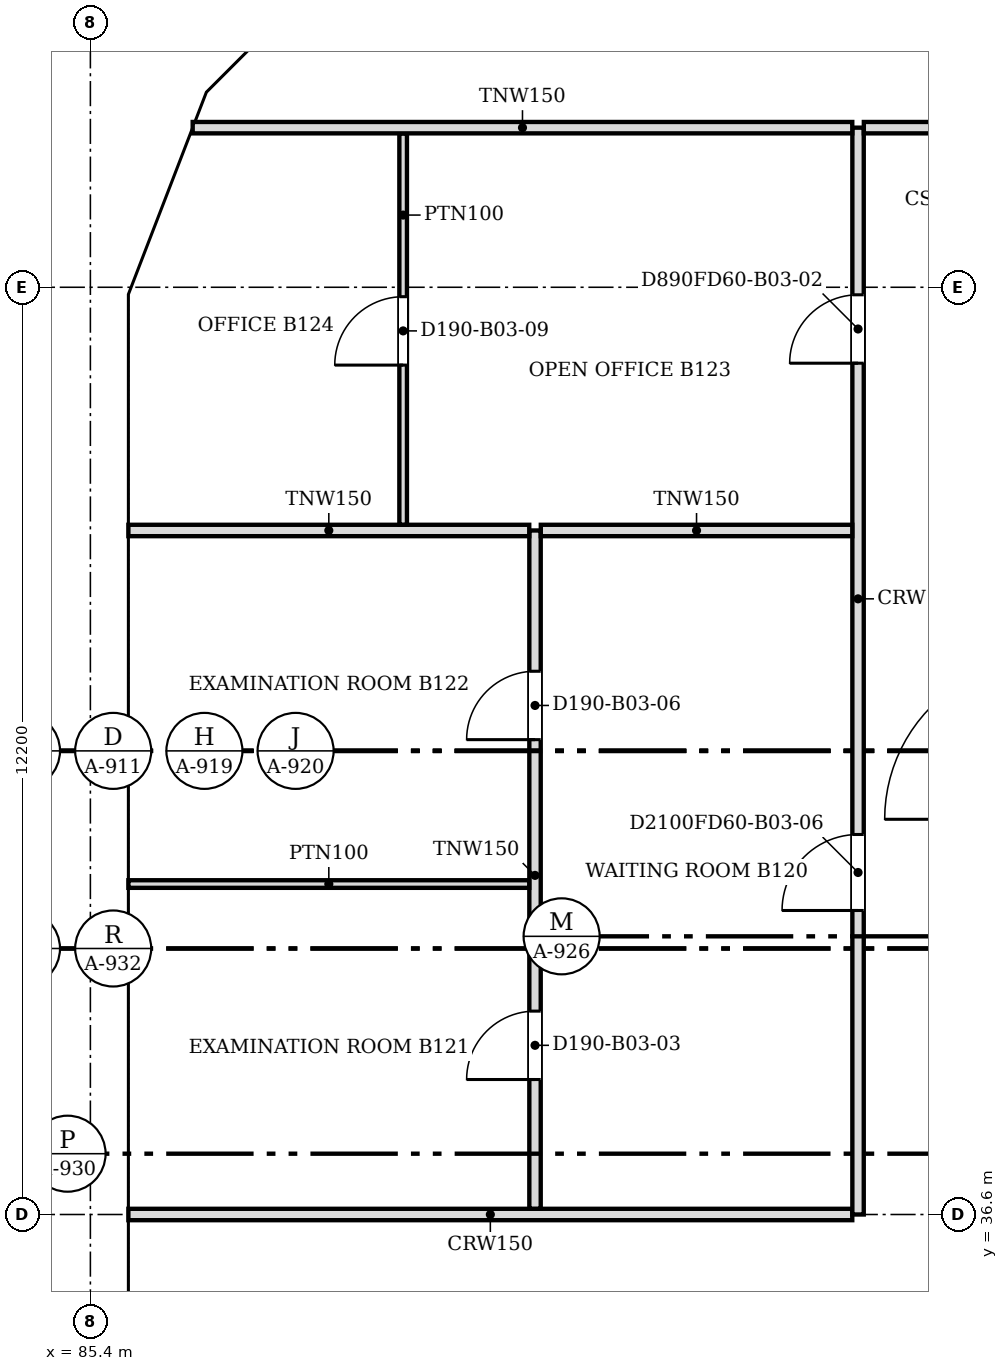
"""IFC4 building model, lengths in metres.
Left out: names, types, materials, properties, quantities, classifications, styles, units other than length and angle.
Written with IfcOpenShell. Run it as: python <this file> out.ifc"""

import sys

from ifc_helpers import new_model, si_unit, direction, frame, frame_2d, origin, place, context, subcontext, project, spatial, polyline, rectangle, outline, extrude, faceted_brep, source, transform, mapped, element, fill, save


model = new_model("IFC4")
c1 = context("Model", 3, precision=1e-05, world=origin(), true_north=direction((0.0, 1.0)))
c2 = subcontext(c1, "Body", "Model", "MODEL_VIEW")
j1 = project(units=[si_unit("LENGTHUNIT", "METRE"), si_unit("PLANEANGLEUNIT", "RADIAN")], contexts=[c1])
p1 = place(None, origin())
s1 = spatial("IfcSite", under=j1, at=p1, CompositionType="ELEMENT")
p2 = place(p1, origin())
s2 = spatial("IfcBuilding", under=s1, at=p2, CompositionType="ELEMENT")
p3 = place(p2, frame((0.0, 0.0, 25.8)))
s3 = spatial("IfcBuildingStorey", under=s2, at=p3, CompositionType="ELEMENT", Elevation=25.8)
m1 = source(origin(), c2, "Body", "Brep", [
    faceted_brep([(2.997, -0.25, 3.732), (2.944, -0.25, 3.8), (0.0, -0.25, 0.0), (2.997, -0.25, 0.0), (0.053, 0.25, 0.068), (2.891, 0.25, 3.732), (2.891, 0.25, 0.0), (0.053, 0.25, 0.0), (2.944, 0.0, 3.8), (0.0, 0.0, 0.0)], [[[0, 1, 2, 3]], [[4, 5, 6, 7]], [[8, 1, 0]], [[5, 4, 9, 2, 1, 8]], [[7, 6, 3, 2, 9]], [[7, 9, 4]], [[3, 6, 5, 8, 0]]]),
])
p4 = place(p3, frame((88.794, 53.588, 0.0), z_axis=(0.0, 0.0, 1.0), x_axis=(-0.707066050402, -0.707147509625, 0.0)))
e1 = element("IfcWall", 1, at=p4, inside=s3, PredefinedType="SOLIDWALL", context=c2, shape_type="MappedRepresentation", body=[
    mapped(m1, transform((0.0, 0.0, 0.0), scale=1.0)),
])
m2 = source(origin(), c2, "Body", "SweptSolid", [
    extrude(outline(polyline([(2.744, 3.134), (0.51, 0.25), (2.744, 0.25), (2.744, 3.134)])), frame((0.0, 0.26, 0.0), z_axis=(0.0, -1.0, 0.0), x_axis=(1.0, 0.0, 0.0)), (0.0, 0.0, 1.0), 0.52),
])
p5 = place(p4, origin())
e2 = element("IfcOpeningElement", 2, at=p5, cuts=e1, PredefinedType="OPENING", context=c2, shape_type="MappedRepresentation", body=[
    mapped(m2, transform((0.0, 0.0, 0.0), scale=1.0)),
])
m3 = source(origin(), c2, "Body", "Brep", [
    faceted_brep([(3.003, -0.25, 0.0), (0.053, -0.25, 3.8), (0.0, -0.25, 3.732), (0.0, -0.25, 0.0), (0.106, 0.25, 3.732), (2.957, 0.25, 0.06), (2.957, 0.25, 0.0), (0.106, 0.25, 0.0), (0.053, 0.0, 3.8), (3.003, 0.0, 0.0)], [[[0, 1, 2, 3]], [[4, 5, 6, 7]], [[5, 4, 8, 1, 0, 9]], [[2, 1, 8]], [[7, 6, 9, 0, 3]], [[7, 3, 2, 8, 4]], [[9, 6, 5]]]),
])
p6 = place(p3, frame((86.731, 51.556, 0.0), z_axis=(0.0, 0.0, 1.0), x_axis=(-0.359855894603, -0.933007896601, 0.0)))
e3 = element("IfcWall", 3, at=p6, inside=s3, PredefinedType="SOLIDWALL", context=c2, shape_type="MappedRepresentation", body=[
    mapped(m3, transform((0.0, 0.0, 0.0), scale=1.0)),
])
m4 = source(origin(), c2, "Body", "SweptSolid", [
    extrude(outline(polyline([(2.493, 0.25), (0.253, 3.135), (0.253, 0.25), (2.493, 0.25)])), frame((0.0, 0.26, 0.0), z_axis=(0.0, -1.0, 0.0), x_axis=(1.0, 0.0, 0.0)), (0.0, 0.0, 1.0), 0.52),
])
p7 = place(p6, origin())
e4 = element("IfcOpeningElement", 4, at=p7, cuts=e3, PredefinedType="OPENING", context=c2, shape_type="MappedRepresentation", body=[
    mapped(m4, transform((0.0, 0.0, 0.0), scale=1.0)),
])
m5 = source(origin(), c2, "Body", "Brep", [
    faceted_brep([(6.053, -0.25, 0.0), (3.003, -0.25, 3.8), (0.0, -0.25, 0.0), (0.047, 0.25, 0.059), (3.003, 0.25, 3.8), (6.053, 0.25, 0.0), (0.047, 0.25, 0.0), (0.0, 0.0, 0.0)], [[[0, 1, 2]], [[3, 4, 5, 6]], [[5, 4, 1, 0]], [[4, 3, 7, 2, 1]], [[6, 5, 0, 2, 7]], [[6, 7, 3]]]),
])
p8 = place(p3, frame((85.65, 48.753, 0.0), z_axis=(0.0, 0.0, 1.0), x_axis=(0.0, -1.0, 0.0)))
e5 = element("IfcWall", 5, at=p8, inside=s3, PredefinedType="SOLIDWALL", context=c2, shape_type="MappedRepresentation", body=[
    mapped(m5, transform((0.0, 0.0, 0.0), scale=1.0)),
])
m6 = source(origin(), c2, "Body", "SweptSolid", [
    extrude(outline(polyline([(5.532, 0.25), (3.005, 3.399), (0.516, 0.25), (5.532, 0.25)])), frame((0.0, 0.26, 0.0), z_axis=(0.0, -1.0, 0.0), x_axis=(1.0, 0.0, 0.0)), (0.0, 0.0, 1.0), 0.52),
])
p9 = place(p8, origin())
e6 = element("IfcOpeningElement", 6, at=p9, cuts=e5, PredefinedType="OPENING", context=c2, shape_type="MappedRepresentation", body=[
    mapped(m6, transform((0.0, 0.0, 0.0), scale=1.0)),
])
m7 = source(origin(), c2, "Body", "Brep", [
    faceted_brep([(6.1, -0.25, 0.0), (3.05, -0.25, 3.8), (0.0, -0.25, 0.0), (6.1, -0.25, 0.0), (0.0, 0.25, 0.0), (3.05, 0.25, 3.8), (6.1, 0.25, 0.0), (6.1, 0.25, 0.0)], [[[0, 1, 2, 3]], [[4, 5, 6, 7]], [[6, 5, 1, 0]], [[5, 4, 2, 1]], [[4, 7, 3, 2]], [[3, 7, 6, 0]]]),
])
p10 = place(p3, frame((85.65, 42.7, 0.0), z_axis=(0.0, 0.0, 1.0), x_axis=(0.0, -1.0, 0.0)))
e7 = element("IfcWall", 7, at=p10, inside=s3, PredefinedType="SOLIDWALL", context=c2, shape_type="MappedRepresentation", body=[
    mapped(m7, transform((0.0, 0.0, 0.0), scale=1.0)),
])
m8 = source(origin(), c2, "Body", "SweptSolid", [
    extrude(outline(polyline([(5.579, 0.25), (3.05, 3.401), (0.521, 0.25), (5.579, 0.25)])), frame((0.0, 0.26, 0.0), z_axis=(0.0, -1.0, 0.0), x_axis=(1.0, 0.0, 0.0)), (0.0, 0.0, 1.0), 0.52),
])
p11 = place(p10, origin())
e8 = element("IfcOpeningElement", 8, at=p11, cuts=e7, PredefinedType="OPENING", context=c2, shape_type="MappedRepresentation", body=[
    mapped(m8, transform((0.0, 0.0, 0.0), scale=1.0)),
])
m9 = source(origin(), c2, "Body", "SweptSolid", [
    extrude(outline(polyline([(6.1, 0.0), (3.05, 3.8), (0.0, 0.0), (6.1, 0.0)])), frame((0.0, 0.25, 0.0), z_axis=(0.0, -1.0, 0.0), x_axis=(1.0, 0.0, 0.0)), (0.0, 0.0, 1.0), 0.5),
])
p12 = place(p3, frame((85.65, 36.6, 0.0), z_axis=(0.0, 0.0, 1.0), x_axis=(0.0, -1.0, 0.0)))
e9 = element("IfcWall", 9, at=p12, inside=s3, PredefinedType="SOLIDWALL", context=c2, shape_type="MappedRepresentation", body=[
    mapped(m9, transform((0.0, 0.0, 0.0), scale=1.0)),
])
p13 = place(p12, origin())
e10 = element("IfcOpeningElement", 10, at=p13, cuts=e9, PredefinedType="OPENING", context=c2, shape_type="MappedRepresentation", body=[
    mapped(m8, transform((0.0, 0.0, 0.0), scale=1.0)),
])
p14 = place(p2, frame((0.0, 0.0, 29.6)))
s4 = spatial("IfcBuildingStorey", under=s2, at=p14, CompositionType="ELEMENT", Elevation=29.6)
m10 = source(origin(), c2, "Body", "Brep", [
    faceted_brep([(0.053, -0.25, 0.0), (2.997, -0.25, 3.8), (0.053, -0.25, 7.6), (0.0, -0.25, 7.532), (0.0, -0.25, 0.068), (0.106, 0.25, 7.531), (2.944, 0.25, 3.868), (2.944, 0.25, 3.732), (0.106, 0.25, 0.068), (2.997, 0.0, 3.8), (0.053, 0.0, 0.0), (0.053, 0.0, 7.6)], [[[0, 1, 2, 3, 4]], [[5, 6, 7, 8]], [[8, 7, 9, 1, 0, 10]], [[6, 5, 11, 2, 1, 9]], [[3, 2, 11]], [[10, 0, 4]], [[8, 10, 4, 3, 11, 5]], [[7, 6, 9]]]),
])
p15 = place(p14, frame((88.831, 53.625, -3.8), z_axis=(0.0, 0.0, 1.0), x_axis=(-0.707147509625, -0.707066050402, 0.0)))
e11 = element("IfcWall", 11, at=p15, inside=s4, PredefinedType="SOLIDWALL", context=c2, shape_type="MappedRepresentation", body=[
    mapped(m10, transform((0.0, 0.0, 0.0), scale=1.0)),
])
m11 = source(origin(), c2, "Body", "SweptSolid", [
    extrude(outline(polyline([(0.253, 0.666), (2.681, 3.8), (0.253, 6.934), (0.253, 0.666)])), frame((0.0, 0.26, 0.0), z_axis=(0.0, -1.0, 0.0), x_axis=(1.0, 0.0, 0.0)), (0.0, 0.0, 1.0), 0.52),
])
p16 = place(p15, origin())
e12 = element("IfcOpeningElement", 12, at=p16, cuts=e11, PredefinedType="OPENING", context=c2, shape_type="MappedRepresentation", body=[
    mapped(m11, transform((0.0, 0.0, 0.0), scale=1.0)),
])
m12 = source(origin(), c2, "Body", "Brep", [
    faceted_brep([(2.95, -0.25, 0.0), (2.997, -0.25, 0.059), (2.997, -0.25, 7.541), (2.95, -0.25, 7.6), (0.0, -0.25, 3.8), (0.053, 0.25, 3.868), (2.904, 0.25, 7.54), (2.904, 0.25, 0.06), (0.053, 0.25, 3.732), (2.95, 0.0, 0.0), (2.95, 0.0, 7.6), (0.0, 0.0, 3.8)], [[[0, 1, 2, 3, 4]], [[5, 6, 7, 8]], [[1, 0, 9]], [[10, 3, 2]], [[6, 5, 11, 4, 3, 10]], [[8, 7, 9, 0, 4, 11]], [[8, 11, 5]], [[1, 9, 7, 6, 10, 2]]]),
])
p17 = place(p14, frame((86.712, 51.506, -3.8), z_axis=(0.0, 0.0, 1.0), x_axis=(-0.359874094142, -0.933000876937, 0.0)))
e13 = element("IfcWall", 13, at=p17, inside=s4, PredefinedType="SOLIDWALL", context=c2, shape_type="MappedRepresentation", body=[
    mapped(m12, transform((0.0, 0.0, 0.0), scale=1.0)),
])
m13 = source(origin(), c2, "Body", "SweptSolid", [
    extrude(outline(polyline([(2.75, 6.935), (0.316, 3.8), (2.75, 0.665), (2.75, 6.935)])), frame((0.0, 0.26, 0.0), z_axis=(0.0, -1.0, 0.0), x_axis=(1.0, 0.0, 0.0)), (0.0, 0.0, 1.0), 0.52),
])
p18 = place(p17, origin())
e14 = element("IfcOpeningElement", 14, at=p18, cuts=e13, PredefinedType="OPENING", context=c2, shape_type="MappedRepresentation", body=[
    mapped(m13, transform((0.0, 0.0, 0.0), scale=1.0)),
])
m14 = source(origin(), c2, "Body", "Brep", [
    faceted_brep([(0.047, -0.25, 0.0), (3.05, -0.25, 3.8), (0.047, -0.25, 7.6), (0.0, -0.25, 7.54), (0.0, -0.25, 0.06), (0.093, 0.25, 7.541), (3.05, 0.25, 3.8), (0.093, 0.25, 0.059), (0.047, 0.0, 0.0), (0.047, 0.0, 7.6)], [[[0, 1, 2, 3, 4]], [[5, 6, 7]], [[7, 6, 1, 0, 8]], [[6, 5, 9, 2, 1]], [[3, 2, 9]], [[8, 0, 4]], [[7, 8, 4, 3, 9, 5]]]),
])
p19 = place(p14, frame((85.65, 48.8, -3.8), z_axis=(0.0, 0.0, 1.0), x_axis=(0.0, -1.0, 0.0)))
e15 = element("IfcWall", 15, at=p19, inside=s4, PredefinedType="SOLIDWALL", context=c2, shape_type="MappedRepresentation", body=[
    mapped(m14, transform((0.0, 0.0, 0.0), scale=1.0)),
])
m15 = source(origin(), c2, "Body", "SweptSolid", [
    extrude(outline(polyline([(0.247, 0.656), (2.731, 3.8), (0.247, 6.944), (0.247, 0.656)])), frame((0.0, 0.26, 0.0), z_axis=(0.0, -1.0, 0.0), x_axis=(1.0, 0.0, 0.0)), (0.0, 0.0, 1.0), 0.52),
])
p20 = place(p19, origin())
e16 = element("IfcOpeningElement", 16, at=p20, cuts=e15, PredefinedType="OPENING", context=c2, shape_type="MappedRepresentation", body=[
    mapped(m15, transform((0.0, 0.0, 0.0), scale=1.0)),
])
m16 = source(origin(), c2, "Body", "SweptSolid", [
    extrude(outline(polyline([(3.05, 0.0), (6.1, 3.8), (3.05, 7.6), (0.0, 3.8), (3.05, 0.0)])), frame((0.0, 0.25, 0.0), z_axis=(0.0, -1.0, 0.0), x_axis=(1.0, 0.0, 0.0)), (0.0, 0.0, 1.0), 0.5),
])
p21 = place(p14, frame((85.65, 45.75, -3.8), z_axis=(0.0, 0.0, 1.0), x_axis=(0.0, -1.0, 0.0)))
e17 = element("IfcWall", 17, at=p21, inside=s4, PredefinedType="SOLIDWALL", context=c2, shape_type="MappedRepresentation", body=[
    mapped(m16, transform((0.0, 0.0, 0.0), scale=1.0)),
])
m17 = source(origin(), c2, "Body", "SweptSolid", [
    extrude(outline(polyline([(3.05, 0.399), (5.78, 3.8), (3.05, 7.2), (0.321, 3.8), (3.05, 0.399)])), frame((0.0, 0.26, 0.0), z_axis=(0.0, -1.0, 0.0), x_axis=(1.0, 0.0, 0.0)), (0.0, 0.0, 1.0), 0.52),
])
p22 = place(p21, origin())
e18 = element("IfcOpeningElement", 18, at=p22, cuts=e17, PredefinedType="OPENING", context=c2, shape_type="MappedRepresentation", body=[
    mapped(m17, transform((0.0, 0.0, 0.0), scale=1.0)),
])
m18 = source(origin(), c2, "Body", "Brep", [
    faceted_brep([(3.05, -0.25, 0.0), (6.1, -0.25, 3.8), (6.1, -0.25, 3.8), (3.05, -0.25, 7.6), (0.0, -0.25, 3.8), (0.0, 0.25, 3.8), (3.05, 0.25, 7.6), (6.1, 0.25, 3.8), (6.1, 0.25, 3.8), (3.05, 0.25, 0.0)], [[[0, 1, 2, 3, 4]], [[5, 6, 7, 8, 9]], [[9, 8, 1, 0]], [[7, 6, 3, 2]], [[6, 5, 4, 3]], [[5, 9, 0, 4]], [[1, 8, 7, 2]]]),
])
p23 = place(p14, frame((85.65, 39.65, -3.8), z_axis=(0.0, 0.0, 1.0), x_axis=(0.0, -1.0, 0.0)))
e19 = element("IfcWall", 19, at=p23, inside=s4, PredefinedType="SOLIDWALL", context=c2, shape_type="MappedRepresentation", body=[
    mapped(m18, transform((0.0, 0.0, 0.0), scale=1.0)),
])
p24 = place(p23, origin())
e20 = element("IfcOpeningElement", 20, at=p24, cuts=e19, PredefinedType="OPENING", context=c2, shape_type="MappedRepresentation", body=[
    mapped(m17, transform((0.0, 0.0, 0.0), scale=1.0)),
])
p25 = place(p3, frame((85.9, 36.6, 0.0), z_axis=(0.0, 0.0, 1.0), x_axis=(1.0, 0.0, 0.0)))
e21 = element("IfcWall", 21, at=p25, inside=s3, PredefinedType="PARTITIONING", context=c2, shape_type="SweptSolid", body=[
    extrude(rectangle(XDim=9.524, YDim=0.15, at=frame_2d((4.762, 0.0))), origin(), (0.0, 0.0, 1.0), 3.067),
])
p26 = place(p3, frame((95.5, 36.6, 0.0), z_axis=(0.0, 0.0, 1.0), x_axis=(0.0, 1.0, 0.0)))
e22 = element("IfcWall", 22, at=p26, inside=s3, PredefinedType="PARTITIONING", context=c2, shape_type="SweptSolid", body=[
    extrude(rectangle(XDim=14.3, YDim=0.15, at=frame_2d((7.15, 0.0))), origin(), (0.0, 0.0, 1.0), 3.067),
])
m19 = source(origin(), c2, "Body", "SweptSolid", [
    extrude(rectangle(XDim=0.9, YDim=2.1, at=frame_2d((0.45, 1.05))), frame((0.0, 0.085, 0.0), z_axis=(0.0, -1.0, 0.0), x_axis=(1.0, 0.0, 0.0)), (0.0, 0.0, 1.0), 0.17),
])
p27 = place(p26, frame((11.201, 0.0, 0.0)))
e23 = element("IfcOpeningElement", 23, at=p27, cuts=e22, PredefinedType="OPENING", context=c2, shape_type="MappedRepresentation", body=[
    mapped(m19, transform((0.0, 0.0, 0.0), scale=1.0)),
])
m20 = source(origin(), c2, "Body", "SweptSolid", [
    extrude(rectangle(XDim=1.0, YDim=2.1, at=frame_2d((0.5, 1.05))), frame((0.0, 0.085, 0.0), z_axis=(0.0, -1.0, 0.0), x_axis=(1.0, 0.0, 0.0)), (0.0, 0.0, 1.0), 0.17),
])
p28 = place(p26, frame((4.0, 0.0, 0.0)))
e24 = element("IfcOpeningElement", 24, at=p28, cuts=e22, PredefinedType="OPENING", context=c2, shape_type="MappedRepresentation", body=[
    mapped(m20, transform((0.0, 0.0, 0.0), scale=1.0)),
])
p29 = place(p3, frame((91.25, 36.676, 0.0), z_axis=(0.0, 0.0, 1.0), x_axis=(0.0, 1.0, 0.0)))
e25 = element("IfcWall", 25, at=p29, inside=s3, PredefinedType="PARTITIONING", context=c2, shape_type="SweptSolid", body=[
    extrude(rectangle(XDim=8.924, YDim=0.15, at=frame_2d((4.462, 0.0))), origin(), (0.0, 0.0, 1.0), 3.067),
])
p30 = place(p29, frame((1.7, 0.0, 0.0)))
e26 = element("IfcOpeningElement", 26, at=p30, cuts=e25, PredefinedType="OPENING", context=c2, shape_type="MappedRepresentation", body=[
    mapped(m19, transform((0.0, 0.0, 0.0), scale=1.0)),
])
p31 = place(p29, frame((6.172, 0.0, 0.0)))
e27 = element("IfcOpeningElement", 27, at=p31, cuts=e25, PredefinedType="OPENING", context=c2, shape_type="MappedRepresentation", body=[
    mapped(m19, transform((0.0, 0.0, 0.0), scale=1.0)),
])
p32 = place(p3, frame((85.9, 40.948, 0.0), z_axis=(0.0, 0.0, 1.0), x_axis=(1.0, 0.0, 0.0)))
e28 = element("IfcWall", 28, at=p32, inside=s3, PredefinedType="PARTITIONING", context=c2, shape_type="SweptSolid", body=[
    extrude(rectangle(XDim=5.274, YDim=0.1, at=frame_2d((2.637, 0.0))), origin(), (0.0, 0.0, 1.0), 3.067),
])
p33 = place(p3, frame((85.9, 45.6, 0.0), z_axis=(0.0, 0.0, 1.0), x_axis=(1.0, 0.0, 0.0)))
e29 = element("IfcWall", 29, at=p33, inside=s3, PredefinedType="PARTITIONING", context=c2, shape_type="SweptSolid", body=[
    extrude(rectangle(XDim=5.274, YDim=0.15, at=frame_2d((2.637, 0.0))), origin(), (0.0, 0.0, 1.0), 3.067),
])
p34 = place(p3, frame((91.326, 45.6, 0.0), z_axis=(0.0, 0.0, 1.0), x_axis=(1.0, 0.0, 0.0)))
e30 = element("IfcWall", 30, at=p34, inside=s3, PredefinedType="PARTITIONING", context=c2, shape_type="SweptSolid", body=[
    extrude(rectangle(XDim=4.098, YDim=0.15, at=frame_2d((2.049, 0.0))), origin(), (0.0, 0.0, 1.0), 3.067),
])
p35 = place(p3, frame((89.515, 45.676, 0.0), z_axis=(0.0, 0.0, 1.0), x_axis=(0.0, 1.0, 0.0)))
e31 = element("IfcWall", 31, at=p35, inside=s3, PredefinedType="PARTITIONING", context=c2, shape_type="SweptSolid", body=[
    extrude(rectangle(XDim=5.148, YDim=0.1, at=frame_2d((2.574, 0.0))), origin(), (0.0, 0.0, 1.0), 3.067),
])
m21 = source(origin(), c2, "Body", "SweptSolid", [
    extrude(rectangle(XDim=0.9, YDim=2.1, at=frame_2d((0.45, 1.05))), frame((0.0, 0.06, 0.0), z_axis=(0.0, -1.0, 0.0), x_axis=(1.0, 0.0, 0.0)), (0.0, 0.0, 1.0), 0.12),
])
p36 = place(p35, frame((2.1, 0.0, 0.0)))
e32 = element("IfcOpeningElement", 32, at=p36, cuts=e31, PredefinedType="OPENING", context=c2, shape_type="MappedRepresentation", body=[
    mapped(m21, transform((0.0, 0.0, 0.0), scale=1.0)),
])
p37 = place(p3, frame((86.746, 50.9, 0.0), z_axis=(0.0, 0.0, 1.0), x_axis=(1.0, 0.0, 0.0)))
e33 = element("IfcWall", 33, at=p37, inside=s3, PredefinedType="PARTITIONING", context=c2, shape_type="SweptSolid", body=[
    extrude(rectangle(XDim=8.678, YDim=0.15, at=frame_2d((4.339, 0.0))), origin(), (0.0, 0.0, 1.0), 3.067),
])
p38 = place(p3, frame((95.576, 50.9, 0.0), z_axis=(0.0, 0.0, 1.0), x_axis=(1.0, 0.0, 0.0)))
e34 = element("IfcWall", 34, at=p38, inside=s3, PredefinedType="PARTITIONING", context=c2, shape_type="SweptSolid", body=[
    extrude(rectangle(XDim=4.424, YDim=0.15, at=frame_2d((2.212, 0.0))), origin(), (0.0, 0.0, 1.0), 3.067),
])
m22 = source(origin(), c2, "Body", "SweptSolid", [
    extrude(rectangle(XDim=0.9, YDim=2.1, at=frame_2d((0.45, 1.05))), frame((0.0, 0.025, 0.0), z_axis=(0.0, -1.0, 0.0), x_axis=(1.0, 0.0, 0.0)), (0.0, 0.0, 1.0), 0.05),
])
p39 = place(p30, origin())
e35 = element("IfcDoor", 35, at=p39, inside=s3, OperationType="SINGLE_SWING_LEFT", PredefinedType="DOOR", context=c2, shape_type="MappedRepresentation", body=[
    mapped(m22, transform((0.0, 0.0, 0.0), scale=1.0)),
])
fill(e26, e35)
p40 = place(p31, origin())
e36 = element("IfcDoor", 36, at=p40, inside=s3, OperationType="SINGLE_SWING_LEFT", PredefinedType="DOOR", context=c2, shape_type="MappedRepresentation", body=[
    mapped(m22, transform((0.0, 0.0, 0.0), scale=1.0)),
])
fill(e27, e36)
p41 = place(p36, origin())
e37 = element("IfcDoor", 37, at=p41, inside=s3, OperationType="SINGLE_SWING_LEFT", PredefinedType="DOOR", context=c2, shape_type="MappedRepresentation", body=[
    mapped(m22, transform((0.0, 0.0, 0.0), scale=1.0)),
])
fill(e32, e37)
p42 = place(p27, origin())
e38 = element("IfcDoor", 38, at=p42, inside=s3, OperationType="SINGLE_SWING_LEFT", PredefinedType="DOOR", context=c2, shape_type="MappedRepresentation", body=[
    mapped(m22, transform((0.0, 0.0, 0.0), scale=1.0)),
])
fill(e23, e38)
m23 = source(origin(), c2, "Body", "SweptSolid", [
    extrude(rectangle(XDim=1.0, YDim=2.1, at=frame_2d((0.5, 1.05))), frame((0.0, 0.025, 0.0), z_axis=(0.0, -1.0, 0.0), x_axis=(1.0, 0.0, 0.0)), (0.0, 0.0, 1.0), 0.05),
])
p43 = place(p28, origin())
e39 = element("IfcDoor", 39, at=p43, inside=s3, OperationType="SINGLE_SWING_LEFT", PredefinedType="DOOR", context=c2, shape_type="MappedRepresentation", body=[
    mapped(m23, transform((0.0, 0.0, 0.0), scale=1.0)),
])
fill(e24, e39)
save(model, sys.argv[1])
